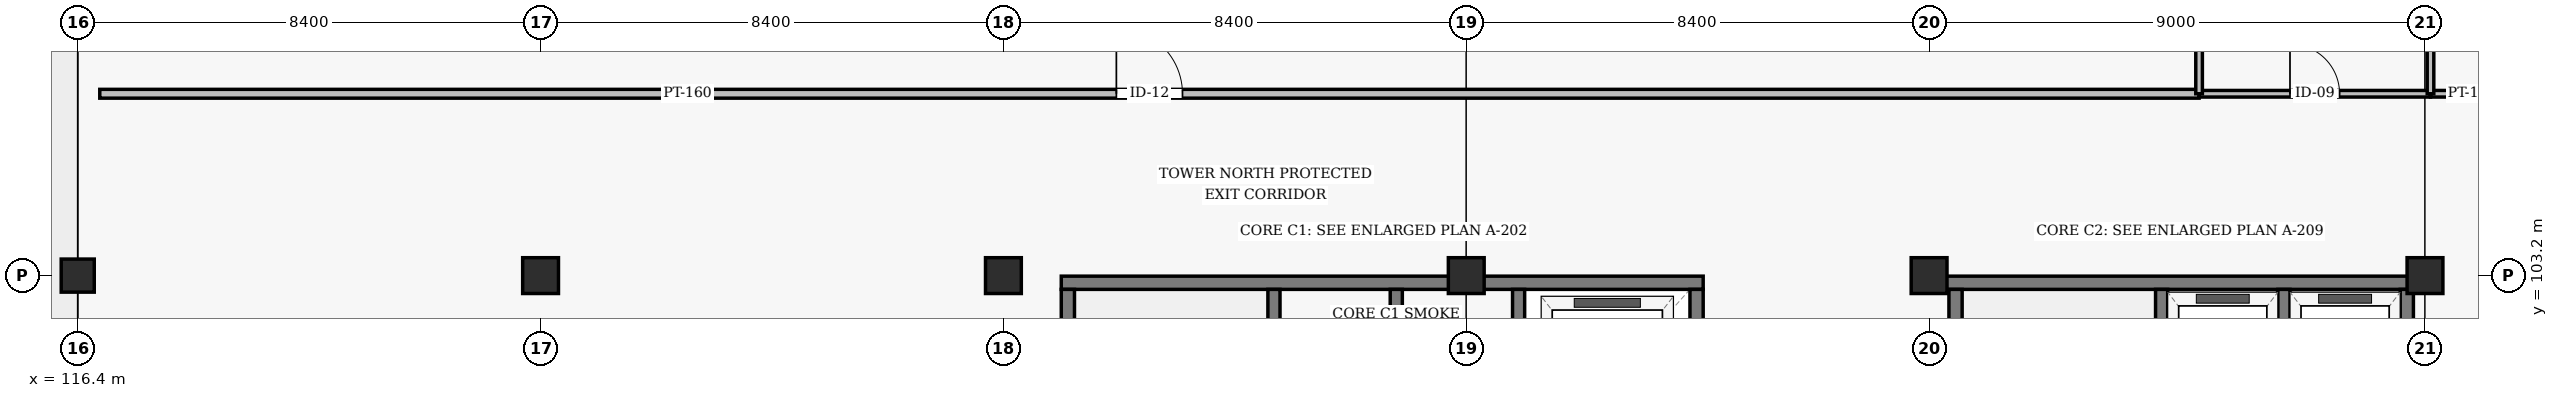
"""IFC4 building model, lengths in metres.
Left out: names, types, materials, properties, quantities, classifications, styles, units other than length and angle.
Written with IfcOpenShell. Run it as: python <this file> out.ifc"""

import sys

from ifc_helpers import new_model, si_unit, direction, frame, frame_2d, origin, origin_2d, place, context, subcontext, project, spatial, rectangle, hollow_rectangle, extrude, element, fill, save


model = new_model("IFC4")
c1 = context("Model", 3, precision=1e-05, world=origin(), true_north=direction((0.0, 1.0)))
c2 = subcontext(c1, "Body", "Model", "MODEL_VIEW")
j1 = project(units=[si_unit("LENGTHUNIT", "METRE"), si_unit("PLANEANGLEUNIT", "RADIAN")], contexts=[c1])
p1 = place(None, origin())
s1 = spatial("IfcSite", under=j1, at=p1, CompositionType="ELEMENT")
p2 = place(p1, origin())
s2 = spatial("IfcBuilding", under=s1, at=p2, CompositionType="ELEMENT")
p3 = place(p2, origin())
s3 = spatial("IfcBuildingStorey", under=s2, at=p3, CompositionType="ELEMENT", Elevation=0.0)
p4 = place(p3, frame((116.4, 103.2, 0.0), z_axis=(0.0, 0.0, 1.0), x_axis=(1.0, 0.0, 0.0)))
e1 = element("IfcColumn", 1, at=p4, inside=s3, PredefinedType="COLUMN", context=c2, shape_type="SweptSolid", body=[
    extrude(hollow_rectangle(XDim=0.6, YDim=0.6, WallThickness=0.025, InnerFilletRadius=0.025, OuterFilletRadius=0.05, at=origin_2d()), origin(), (0.0, 0.0, 1.0), 4.8),
])
for number, where, z_axis, x_axis in (
    (2, (124.8, 103.2, 0.0), (0.0, 0.0, 1.0), (1.0, 0.0, 0.0)),
    (3, (133.2, 103.2, 0.0), (0.0, 0.0, 1.0), (1.0, 0.0, 0.0)),
    (4, (141.6, 103.2, 0.0), (0.0, 0.0, 1.0), (1.0, 0.0, 0.0)),
    (5, (150.0, 103.2, 0.0), (0.0, 0.0, 1.0), (1.0, 0.0, 0.0)),
    (6, (159.0, 103.2, 0.0), (0.0, 0.0, 1.0), (1.0, 0.0, 0.0)),
):
    element("IfcColumn", number, at=place(p3, frame(where, z_axis=z_axis, x_axis=x_axis)), inside=s3, PredefinedType="COLUMN", context=c2, shape_type="SweptSolid", body=[
        extrude(hollow_rectangle(XDim=0.65, YDim=0.65, WallThickness=0.028, InnerFilletRadius=0.028, OuterFilletRadius=0.056, at=origin_2d()), origin(), (0.0, 0.0, 1.0), 4.8),
    ])
p5 = place(p3, frame((134.25, 103.07, 0.0), z_axis=(0.0, 0.0, 1.0), x_axis=(1.0, 0.0, 0.0)))
e7 = element("IfcWall", 7, at=p5, inside=s3, PredefinedType="SHEAR", context=c2, shape_type="SweptSolid", body=[
    extrude(rectangle(XDim=11.65, YDim=0.24, at=frame_2d((5.825, 0.0))), origin(), (0.0, 0.0, 1.0), 4.56),
])
p6 = place(p3, frame((134.37, 95.05, 0.0), z_axis=(0.0, 0.0, 1.0), x_axis=(0.0, 1.0, 0.0)))
e8 = element("IfcWall", 8, at=p6, inside=s3, PredefinedType="SHEAR", context=c2, shape_type="SweptSolid", body=[
    extrude(rectangle(XDim=7.9, YDim=0.24, at=frame_2d((3.95, 0.0))), origin(), (0.0, 0.0, 1.0), 4.56),
])
p7 = place(p3, frame((138.11, 95.05, 0.0), z_axis=(0.0, 0.0, 1.0), x_axis=(0.0, 1.0, 0.0)))
e9 = element("IfcWall", 9, at=p7, inside=s3, PredefinedType="SHEAR", context=c2, shape_type="SweptSolid", body=[
    extrude(rectangle(XDim=7.9, YDim=0.22, at=frame_2d((3.95, 0.0))), origin(), (0.0, 0.0, 1.0), 4.56),
])
p8 = place(p3, frame((140.33, 98.54, 0.0), z_axis=(0.0, 0.0, 1.0), x_axis=(0.0, 1.0, 0.0)))
e10 = element("IfcWall", 10, at=p8, inside=s3, PredefinedType="SHEAR", context=c2, shape_type="SweptSolid", body=[
    extrude(rectangle(XDim=4.41, YDim=0.22, at=frame_2d((2.205, 0.0))), origin(), (0.0, 0.0, 1.0), 4.56),
])
p9 = place(p3, frame((142.55, 95.05, 0.0), z_axis=(0.0, 0.0, 1.0), x_axis=(0.0, 1.0, 0.0)))
e11 = element("IfcWall", 11, at=p9, inside=s3, PredefinedType="SHEAR", context=c2, shape_type="SweptSolid", body=[
    extrude(rectangle(XDim=7.9, YDim=0.22, at=frame_2d((3.95, 0.0))), origin(), (0.0, 0.0, 1.0), 4.56),
])
p10 = place(p3, frame((145.78, 95.05, 0.0), z_axis=(0.0, 0.0, 1.0), x_axis=(0.0, 1.0, 0.0)))
e12 = element("IfcWall", 12, at=p10, inside=s3, PredefinedType="SHEAR", context=c2, shape_type="SweptSolid", body=[
    extrude(rectangle(XDim=7.9, YDim=0.24, at=frame_2d((3.95, 0.0))), origin(), (0.0, 0.0, 1.0), 4.56),
])
p11 = place(p3, frame((150.02, 103.07, 0.0), z_axis=(0.0, 0.0, 1.0), x_axis=(1.0, 0.0, 0.0)))
e13 = element("IfcWall", 13, at=p11, inside=s3, PredefinedType="SHEAR", context=c2, shape_type="SweptSolid", body=[
    extrude(rectangle(XDim=8.77, YDim=0.24, at=frame_2d((4.385, 0.0))), origin(), (0.0, 0.0, 1.0), 4.56),
])
p12 = place(p3, frame((150.48, 95.05, 0.0), z_axis=(0.0, 0.0, 1.0), x_axis=(0.0, 1.0, 0.0)))
e14 = element("IfcWall", 14, at=p12, inside=s3, PredefinedType="SHEAR", context=c2, shape_type="SweptSolid", body=[
    extrude(rectangle(XDim=7.9, YDim=0.24, at=frame_2d((3.95, 0.0))), origin(), (0.0, 0.0, 1.0), 4.56),
])
p13 = place(p3, frame((154.22, 95.05, 0.0), z_axis=(0.0, 0.0, 1.0), x_axis=(0.0, 1.0, 0.0)))
e15 = element("IfcWall", 15, at=p13, inside=s3, PredefinedType="SHEAR", context=c2, shape_type="SweptSolid", body=[
    extrude(rectangle(XDim=7.9, YDim=0.22, at=frame_2d((3.95, 0.0))), origin(), (0.0, 0.0, 1.0), 4.56),
])
p14 = place(p3, frame((158.67, 95.05, 0.0), z_axis=(0.0, 0.0, 1.0), x_axis=(0.0, 1.0, 0.0)))
e16 = element("IfcWall", 16, at=p14, inside=s3, PredefinedType="SHEAR", context=c2, shape_type="SweptSolid", body=[
    extrude(rectangle(XDim=7.9, YDim=0.24, at=frame_2d((3.95, 0.0))), origin(), (0.0, 0.0, 1.0), 4.56),
])
p15 = place(p14, frame((3.05, 0.0, 0.0)))
e17 = element("IfcOpeningElement", 17, at=p15, cuts=e16, PredefinedType="OPENING", context=c2, shape_type="SweptSolid", body=[
    extrude(rectangle(XDim=1.48, YDim=2.22, at=frame_2d((0.74, 1.11))), frame((0.0, 0.13, 0.0), z_axis=(0.0, -1.0, 0.0), x_axis=(1.0, 0.0, 0.0)), (0.0, 0.0, 1.0), 0.26),
])
p16 = place(p3, frame((156.44, 100.25, 0.0), z_axis=(0.0, 0.0, 1.0), x_axis=(0.0, 1.0, 0.0)))
e18 = element("IfcWall", 18, at=p16, inside=s3, PredefinedType="SHEAR", context=c2, shape_type="SweptSolid", body=[
    extrude(rectangle(XDim=2.7, YDim=0.22, at=frame_2d((1.35, 0.0))), origin(), (0.0, 0.0, 1.0), 4.56),
])
p17 = place(p3, frame((116.8, 106.5, 0.0), z_axis=(0.0, 0.0, 1.0), x_axis=(1.0, 0.0, 0.0)))
e19 = element("IfcWall", 19, at=p17, inside=s3, PredefinedType="PARTITIONING", context=c2, shape_type="SweptSolid", body=[
    extrude(rectangle(XDim=38.1, YDim=0.16, at=frame_2d((19.05, 0.0))), origin(), (0.0, 0.0, 1.0), 3.81),
])
p18 = place(p17, frame((18.45, 0.0, 0.0)))
e20 = element("IfcOpeningElement", 20, at=p18, cuts=e19, PredefinedType="OPENING", context=c2, shape_type="SweptSolid", body=[
    extrude(rectangle(XDim=1.2, YDim=2.08, at=frame_2d((0.6, 1.04))), frame((0.0, 0.09, 0.0), z_axis=(0.0, -1.0, 0.0), x_axis=(1.0, 0.0, 0.0)), (0.0, 0.0, 1.0), 0.18),
])
p19 = place(p3, frame((154.9, 106.5, 0.0), z_axis=(0.0, 0.0, 1.0), x_axis=(1.0, 0.0, 0.0)))
e21 = element("IfcWall", 21, at=p19, inside=s3, PredefinedType="PARTITIONING", context=c2, shape_type="SweptSolid", body=[
    extrude(rectangle(XDim=4.2, YDim=0.12, at=frame_2d((2.1, 0.0))), origin(), (0.0, 0.0, 1.0), 3.81),
])
p20 = place(p19, frame((1.65, 0.0, 0.0)))
e22 = element("IfcOpeningElement", 22, at=p20, cuts=e21, PredefinedType="OPENING", context=c2, shape_type="SweptSolid", body=[
    extrude(rectangle(XDim=0.9, YDim=2.1, at=frame_2d((0.45, 1.05))), frame((0.0, 0.07, 0.0), z_axis=(0.0, -1.0, 0.0), x_axis=(1.0, 0.0, 0.0)), (0.0, 0.0, 1.0), 0.14),
])
p21 = place(p3, frame((159.1, 106.5, 0.0), z_axis=(0.0, 0.0, 1.0), x_axis=(1.0, 0.0, 0.0)))
e23 = element("IfcWall", 23, at=p21, inside=s3, PredefinedType="PARTITIONING", context=c2, shape_type="SweptSolid", body=[
    extrude(rectangle(XDim=4.2, YDim=0.12, at=frame_2d((2.1, 0.0))), origin(), (0.0, 0.0, 1.0), 4.56),
])
p22 = place(p21, frame((1.6, 0.0, 0.0)))
e24 = element("IfcOpeningElement", 24, at=p22, cuts=e23, PredefinedType="OPENING", context=c2, shape_type="SweptSolid", body=[
    extrude(rectangle(XDim=1.0, YDim=2.1, at=frame_2d((0.5, 1.05))), frame((0.0, 0.07, 0.0), z_axis=(0.0, -1.0, 0.0), x_axis=(1.0, 0.0, 0.0)), (0.0, 0.0, 1.0), 0.14),
])
p23 = place(p3, frame((154.9, 106.5, 0.0), z_axis=(0.0, 0.0, 1.0), x_axis=(0.0, 1.0, 0.0)))
e25 = element("IfcWall", 25, at=p23, inside=s3, PredefinedType="PARTITIONING", context=c2, shape_type="SweptSolid", body=[
    extrude(rectangle(XDim=8.3, YDim=0.12, at=frame_2d((4.15, 0.0))), origin(), (0.0, 0.0, 1.0), 4.16),
])
p24 = place(p3, frame((159.1, 106.5, 0.0), z_axis=(0.0, 0.0, 1.0), x_axis=(0.0, 1.0, 0.0)))
e26 = element("IfcWall", 26, at=p24, inside=s3, PredefinedType="PARTITIONING", context=c2, shape_type="SweptSolid", body=[
    extrude(rectangle(XDim=8.3, YDim=0.12, at=frame_2d((4.15, 0.0))), origin(), (0.0, 0.0, 1.0), 3.81),
])
p25 = place(p18, origin())
e27 = element("IfcDoor", 27, at=p25, inside=s3, OperationType="SINGLE_SWING_LEFT", PredefinedType="DOOR", context=c2, shape_type="SweptSolid", body=[
    extrude(rectangle(XDim=1.2, YDim=2.08, at=frame_2d((0.6, 1.04))), frame((0.0, 0.025, 0.0), z_axis=(0.0, -1.0, 0.0), x_axis=(1.0, 0.0, 0.0)), (0.0, 0.0, 1.0), 0.05),
])
fill(e20, e27)
p26 = place(p20, origin())
e28 = element("IfcDoor", 28, at=p26, inside=s3, OperationType="SINGLE_SWING_LEFT", PredefinedType="DOOR", context=c2, shape_type="SweptSolid", body=[
    extrude(rectangle(XDim=0.9, YDim=2.1, at=frame_2d((0.45, 1.05))), frame((0.0, 0.025, 0.0), z_axis=(0.0, -1.0, 0.0), x_axis=(1.0, 0.0, 0.0)), (0.0, 0.0, 1.0), 0.05),
])
fill(e22, e28)
save(model, sys.argv[1])
